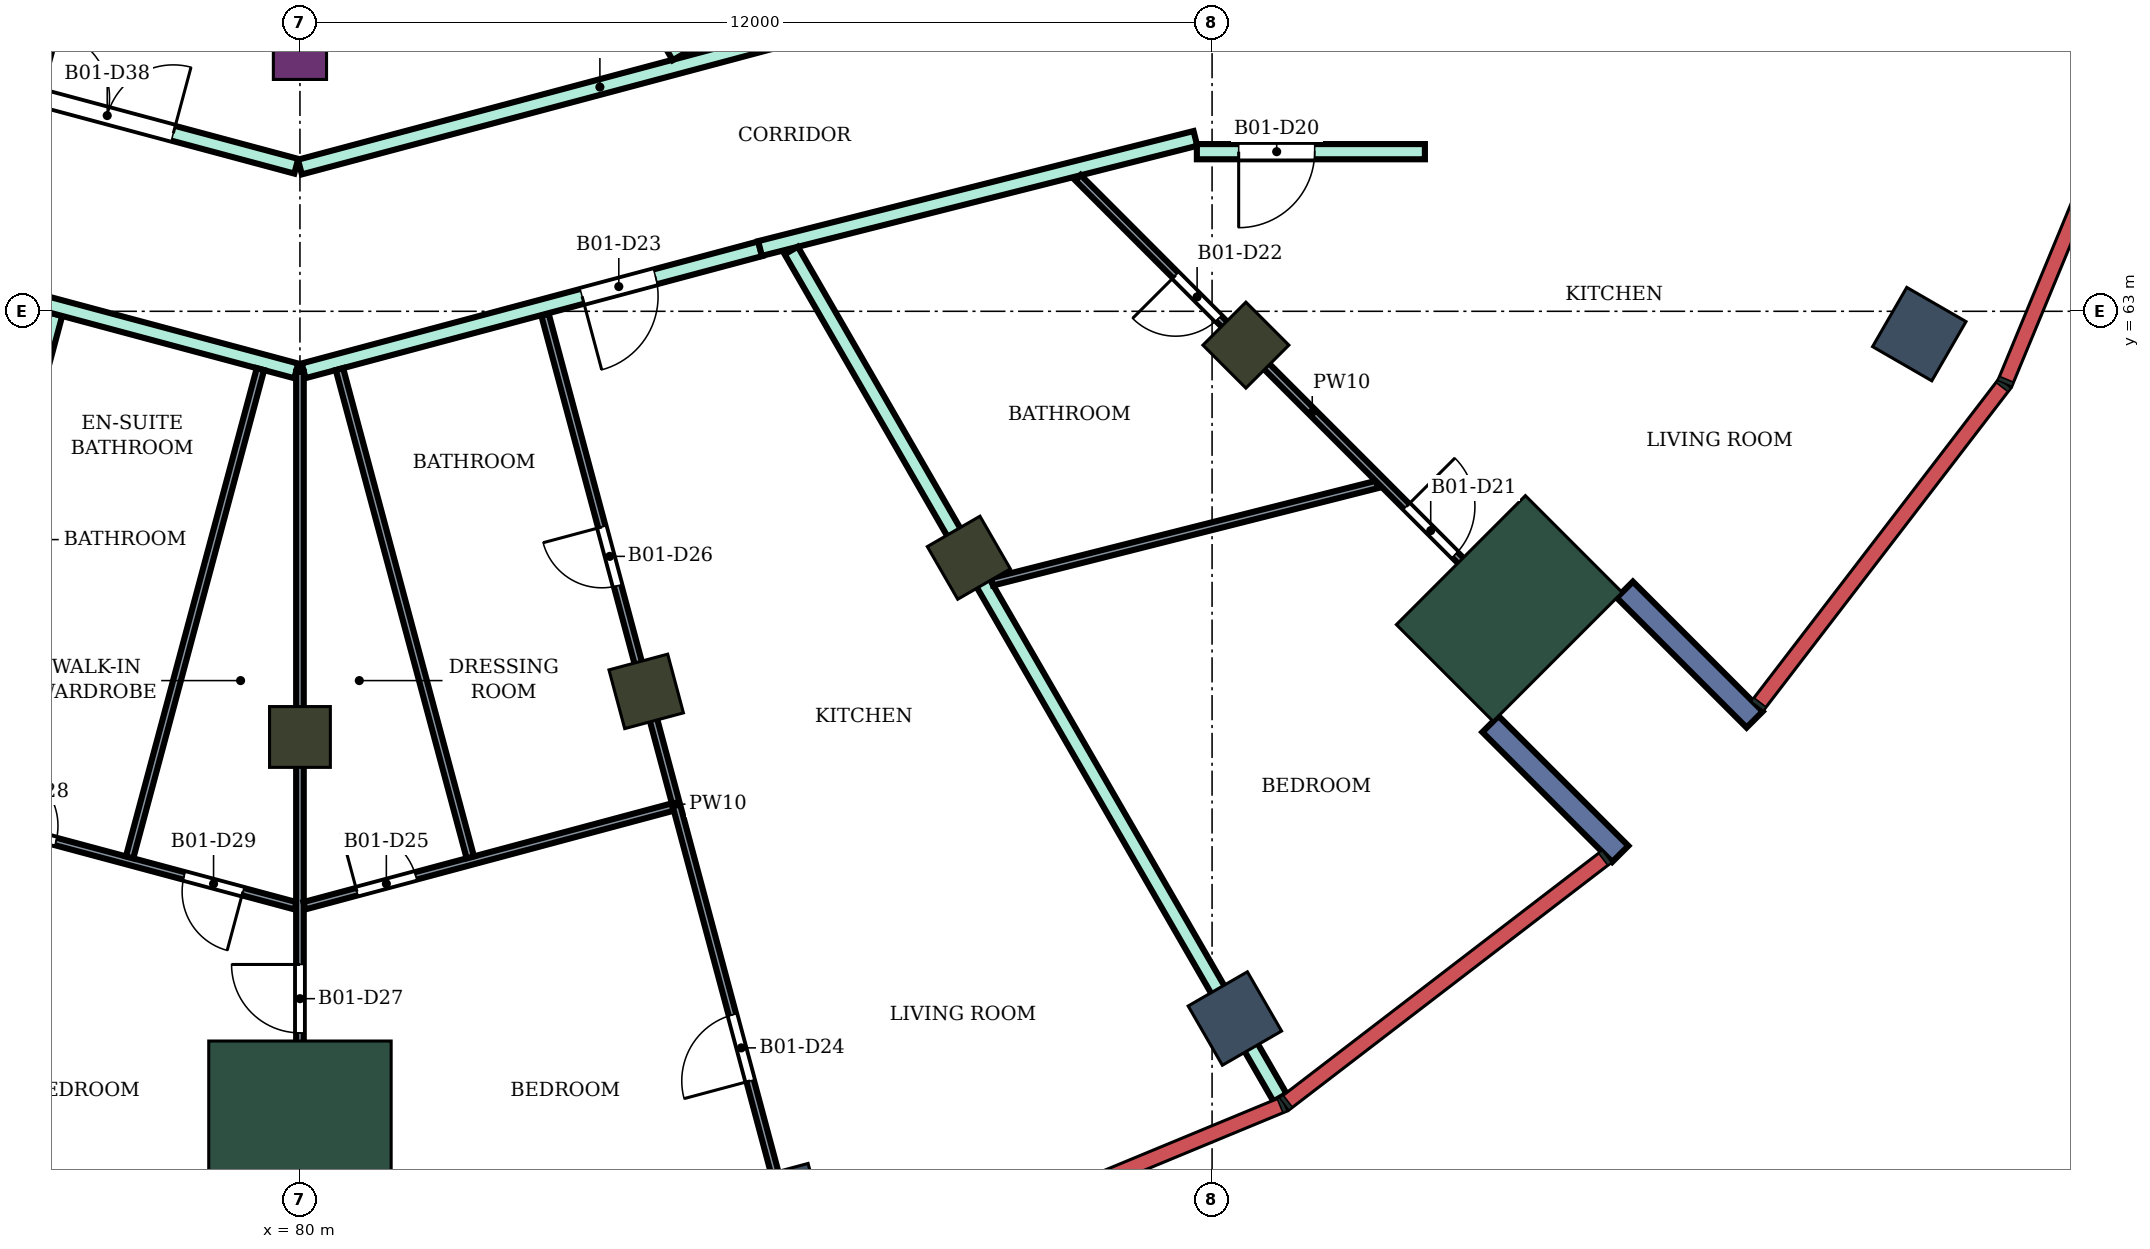
"""IFC4 building model, lengths in metres.
Left out: names, types, materials, properties, quantities, classifications, styles, units other than length and angle.
Written with IfcOpenShell. Run it as: python <this file> out.ifc"""

import sys

from ifc_helpers import new_model, si_unit, direction, frame, frame_2d, origin, origin_2d, place, context, subcontext, project, spatial, rectangle, extrude, element, fill, save


model = new_model("IFC4")
c1 = context("Model", 3, precision=1e-05, world=origin(), true_north=direction((0.0, 1.0)))
c2 = subcontext(c1, "Body", "Model", "MODEL_VIEW")
j1 = project(units=[si_unit("LENGTHUNIT", "METRE"), si_unit("PLANEANGLEUNIT", "RADIAN")], contexts=[c1])
p1 = place(None, origin())
s1 = spatial("IfcSite", under=j1, at=p1, CompositionType="ELEMENT")
p2 = place(p1, origin())
s2 = spatial("IfcBuilding", under=s1, at=p2, CompositionType="ELEMENT")
p3 = place(p2, frame((0.0, 0.0, 216.7)))
s3 = spatial("IfcBuildingStorey", under=s2, at=p3, CompositionType="ELEMENT", Elevation=216.7)
for number, where, z_axis, x_axis in (
    (1, (86.367, 51.238, 0.0), (0.0, 0.0, 1.0), (0.259, -0.966, 0.0)),
    (2, (92.3, 53.696, 0.0), (0.0, 0.0, 1.0), (0.5, -0.866, 0.0)),
    (3, (101.304, 62.7, 0.0), (0.0, 0.0, 1.0), (0.866, -0.5, 0.0)),
):
    element("IfcColumn", number, at=place(p3, frame(where, z_axis=z_axis, x_axis=x_axis)), inside=s3, PredefinedType="COLUMN", context=c2, shape_type="SweptSolid", body=[
        extrude(rectangle(XDim=0.9, YDim=0.9, at=origin_2d()), origin(), (0.0, 0.0, 1.0), 4.2),
    ])
for number, where, z_axis, x_axis in (
    (4, (80.0, 57.4, 0.0), (0.0, 0.0, 1.0), (0.0, -1.0, 0.0)),
    (5, (84.555, 58.0, 0.0), (0.0, 0.0, 1.0), (0.259, -0.966, 0.0)),
    (6, (88.8, 59.758, 0.0), (0.0, 0.0, 1.0), (0.5, -0.866, 0.0)),
    (7, (92.445, 62.555, 0.0), (0.0, 0.0, 1.0), (0.707, -0.707, 0.0)),
):
    element("IfcColumn", number, at=place(p3, frame(where, z_axis=z_axis, x_axis=x_axis)), inside=s3, PredefinedType="COLUMN", context=c2, shape_type="SweptSolid", body=[
        extrude(rectangle(XDim=0.8, YDim=0.8, at=origin_2d()), origin(), (0.0, 0.0, 1.0), 4.2),
    ])
p4 = place(p3, frame((80.0, 66.4, 0.0), z_axis=(0.0, 0.0, 1.0), x_axis=(0.0, -1.0, 0.0)))
e8 = element("IfcColumn", 8, at=p4, inside=s3, PredefinedType="COLUMN", context=c2, shape_type="SweptSolid", body=[
    extrude(rectangle(XDim=0.7, YDim=0.7, at=origin_2d()), origin(), (0.0, 0.0, 1.0), 4.2),
])
for number, where, z_axis, x_axis in (
    (9, (80.0, 52.5, 0.0), (0.0, 0.0, 1.0), (0.0, -1.0, 0.0)),
    (10, (95.91, 59.09, 0.0), (0.0, 0.0, 1.0), (0.707, -0.707, 0.0)),
):
    element("IfcColumn", number, at=place(p3, frame(where, z_axis=z_axis, x_axis=x_axis)), inside=s3, PredefinedType="COLUMN", context=c2, shape_type="SweptSolid", body=[
        extrude(rectangle(XDim=1.8, YDim=2.4, at=origin_2d()), origin(), (0.0, 0.0, 1.0), 4.2),
    ])
for number, where, z_axis, x_axis in (
    (11, (95.662, 57.57, 0.0), (0.0, 0.0, 1.0), (0.707, -0.707, 0.0)),
    (12, (97.43, 59.338, 0.0), (0.0, 0.0, 1.0), (0.707, -0.707, 0.0)),
):
    element("IfcWall", number, at=place(p3, frame(where, z_axis=z_axis, x_axis=x_axis)), inside=s3, PredefinedType="NOTDEFINED", context=c2, shape_type="SweptSolid", body=[
        extrude(rectangle(XDim=2.416, YDim=0.3, at=frame_2d((1.208, 0.0))), origin(), (0.0, 0.0, 1.0), 4.2),
    ])
p5 = place(p3, frame((73.323, 50.081, 0.0), z_axis=(0.0, 0.0, 1.0), x_axis=(0.258837030899, 0.96592100683, 0.0)))
e13 = element("IfcWall", 13, at=p5, inside=s3, PredefinedType="PARTITIONING", context=c2, shape_type="SweptSolid", body=[
    extrude(rectangle(XDim=13.338, YDim=0.2, at=frame_2d((6.669, 0.0))), origin(), (0.0, 0.0, 1.0), 3.75),
])
p6 = place(p3, frame((73.947, 63.826, 0.0), z_axis=(0.0, 0.0, 1.0), x_axis=(0.965876152316, -0.259004359784, 0.0)))
e14 = element("IfcWall", 14, at=p6, inside=s3, PredefinedType="PARTITIONING", context=c2, shape_type="SweptSolid", body=[
    extrude(rectangle(XDim=6.217, YDim=0.2, at=frame_2d((3.108, 0.0))), origin(), (0.0, 0.0, 1.0), 3.75),
])
p7 = place(p6, frame((0.137, 0.0, 0.0)))
e15 = element("IfcOpeningElement", 15, at=p7, cuts=e14, PredefinedType="OPENING", context=c2, shape_type="SweptSolid", body=[
    extrude(rectangle(XDim=1.0, YDim=2.1, at=frame_2d((0.5, 1.05))), frame((0.0, 0.11, 0.0), z_axis=(0.0, -1.0, 0.0), x_axis=(1.0, 0.0, 0.0)), (0.0, 0.0, 1.0), 0.22),
])
p8 = place(p3, frame((74.603, 66.342, 0.0), z_axis=(0.0, 0.0, 1.0), x_axis=(0.965895298152, -0.258932950796, 0.0)))
e16 = element("IfcWall", 16, at=p8, inside=s3, PredefinedType="PARTITIONING", context=c2, shape_type="SweptSolid", body=[
    extrude(rectangle(XDim=5.538, YDim=0.2, at=frame_2d((2.769, 0.0))), origin(), (0.0, 0.0, 1.0), 3.75),
])
p9 = place(p8, frame((2.062, 0.0, 0.0)))
e17 = element("IfcOpeningElement", 17, at=p9, cuts=e16, PredefinedType="OPENING", context=c2, shape_type="SweptSolid", body=[
    extrude(rectangle(XDim=1.8, YDim=2.1, at=frame_2d((0.9, 1.05))), frame((0.0, 0.11, 0.0), z_axis=(0.0, -1.0, 0.0), x_axis=(1.0, 0.0, 0.0)), (0.0, 0.0, 1.0), 0.22),
])
p10 = place(p3, frame((80.0, 64.898, 0.0), z_axis=(0.0, 0.0, 1.0), x_axis=(0.966237419782, 0.257653349704, 0.0)))
e18 = element("IfcWall", 18, at=p10, inside=s3, PredefinedType="PARTITIONING", context=c2, shape_type="SweptSolid", body=[
    extrude(rectangle(XDim=8.169, YDim=0.2, at=frame_2d((4.084, 0.0))), origin(), (0.0, 0.0, 1.0), 3.75),
])
p11 = place(p10, frame((6.428, 0.0, 0.0)))
e19 = element("IfcOpeningElement", 19, at=p11, cuts=e18, PredefinedType="OPENING", context=c2, shape_type="SweptSolid", body=[
    extrude(rectangle(XDim=0.9, YDim=2.1, at=frame_2d((0.45, 1.05))), frame((0.0, 0.11, 0.0), z_axis=(0.0, -1.0, 0.0), x_axis=(1.0, 0.0, 0.0)), (0.0, 0.0, 1.0), 0.22),
])
p12 = place(p3, frame((80.048, 62.217, 0.0), z_axis=(0.0, 0.0, 1.0), x_axis=(0.966097920642, 0.258175923996, 0.0)))
e20 = element("IfcWall", 20, at=p12, inside=s3, PredefinedType="PARTITIONING", context=c2, shape_type="SweptSolid", body=[
    extrude(rectangle(XDim=6.217, YDim=0.2, at=frame_2d((3.108, 0.0))), origin(), (0.0, 0.0, 1.0), 3.75),
])
p13 = place(p12, frame((3.792, 0.0, 0.0)))
e21 = element("IfcOpeningElement", 21, at=p13, cuts=e20, PredefinedType="OPENING", context=c2, shape_type="SweptSolid", body=[
    extrude(rectangle(XDim=1.0, YDim=2.1, at=frame_2d((0.5, 1.05))), frame((0.0, 0.11, 0.0), z_axis=(0.0, -1.0, 0.0), x_axis=(1.0, 0.0, 0.0)), (0.0, 0.0, 1.0), 0.22),
])
p14 = place(p3, frame((83.848, 68.331, 0.0), z_axis=(0.0, 0.0, 1.0), x_axis=(0.499851978358, -0.866110847255, 0.0)))
e22 = element("IfcWall", 22, at=p14, inside=s3, PredefinedType="PARTITIONING", context=c2, shape_type="SweptSolid", body=[
    extrude(rectangle(XDim=2.284, YDim=0.2, at=frame_2d((1.142, 0.0))), origin(), (0.0, 0.0, 1.0), 3.75),
])
p15 = place(p3, frame((86.053, 63.826, 0.0), z_axis=(0.0, 0.0, 1.0), x_axis=(0.969490004987, 0.245130843083, 0.0)))
e23 = element("IfcWall", 23, at=p15, inside=s3, PredefinedType="PARTITIONING", context=c2, shape_type="SweptSolid", body=[
    extrude(rectangle(XDim=5.908, YDim=0.2, at=frame_2d((2.954, 0.0))), origin(), (0.0, 0.0, 1.0), 3.75),
])
p16 = place(p3, frame((86.463, 63.8, 0.0), z_axis=(0.0, 0.0, 1.0), x_axis=(0.499827034849, -0.866125242234, 0.0)))
e24 = element("IfcWall", 24, at=p16, inside=s3, PredefinedType="PARTITIONING", context=c2, shape_type="SweptSolid", body=[
    extrude(rectangle(XDim=12.866, YDim=0.2, at=frame_2d((6.433, 0.0))), origin(), (0.0, 0.0, 1.0), 3.75),
])
p17 = place(p3, frame((91.8, 65.1, 0.0), z_axis=(0.0, 0.0, 1.0), x_axis=(1.0, 0.0, 0.0)))
e25 = element("IfcWall", 25, at=p17, inside=s3, PredefinedType="PARTITIONING", context=c2, shape_type="SweptSolid", body=[
    extrude(rectangle(XDim=3.0, YDim=0.2, at=frame_2d((1.5, 0.0))), origin(), (0.0, 0.0, 1.0), 3.75),
])
p18 = place(p17, frame((0.55, 0.0, 0.0)))
e26 = element("IfcOpeningElement", 26, at=p18, cuts=e25, PredefinedType="OPENING", context=c2, shape_type="SweptSolid", body=[
    extrude(rectangle(XDim=1.0, YDim=2.1, at=frame_2d((0.5, 1.05))), frame((0.0, 0.11, 0.0), z_axis=(0.0, -1.0, 0.0), x_axis=(1.0, 0.0, 0.0)), (0.0, 0.0, 1.0), 0.22),
])
p19 = place(p3, frame((70.188, 57.794, 0.0), z_axis=(0.0, 0.0, 1.0), x_axis=(0.965894620005, -0.25893548047, 0.0)))
e27 = element("IfcWall", 27, at=p19, inside=s3, PredefinedType="PARTITIONING", context=c2, shape_type="SweptSolid", body=[
    extrude(rectangle(XDim=10.098, YDim=0.1, at=frame_2d((5.049, 0.0))), origin(), (0.0, 0.0, 1.0), 3.75),
])
p20 = place(p19, frame((6.034, 0.0, 0.0)))
e28 = element("IfcOpeningElement", 28, at=p20, cuts=e27, PredefinedType="OPENING", context=c2, shape_type="SweptSolid", body=[
    extrude(rectangle(XDim=0.8, YDim=2.1, at=frame_2d((0.4, 1.05))), frame((0.0, 0.06, 0.0), z_axis=(0.0, -1.0, 0.0), x_axis=(1.0, 0.0, 0.0)), (0.0, 0.0, 1.0), 0.12),
])
p21 = place(p19, frame((8.581, 0.0, 0.0)))
e29 = element("IfcOpeningElement", 29, at=p21, cuts=e27, PredefinedType="OPENING", context=c2, shape_type="SweptSolid", body=[
    extrude(rectangle(XDim=0.8, YDim=2.1, at=frame_2d((0.4, 1.05))), frame((0.0, 0.06, 0.0), z_axis=(0.0, -1.0, 0.0), x_axis=(1.0, 0.0, 0.0)), (0.0, 0.0, 1.0), 0.12),
])
p22 = place(p19, frame((1.156, 0.0, 0.0)))
e30 = element("IfcOpeningElement", 30, at=p22, cuts=e27, PredefinedType="OPENING", context=c2, shape_type="SweptSolid", body=[
    extrude(rectangle(XDim=0.9, YDim=2.1, at=frame_2d((0.45, 1.05))), frame((0.0, 0.06, 0.0), z_axis=(0.0, -1.0, 0.0), x_axis=(1.0, 0.0, 0.0)), (0.0, 0.0, 1.0), 0.12),
])
p23 = place(p3, frame((77.759, 55.816, 0.0), z_axis=(0.0, 0.0, 1.0), x_axis=(0.258802763352, 0.965930188824, 0.0)))
e31 = element("IfcWall", 31, at=p23, inside=s3, PredefinedType="PARTITIONING", context=c2, shape_type="SweptSolid", body=[
    extrude(rectangle(XDim=6.65, YDim=0.1, at=frame_2d((3.325, 0.0))), origin(), (0.0, 0.0, 1.0), 3.75),
])
p24 = place(p3, frame((80.0, 51.8, 0.0), z_axis=(0.0, 0.0, 1.0), x_axis=(0.0, 1.0, 0.0)))
e32 = element("IfcWall", 32, at=p24, inside=s3, PredefinedType="PARTITIONING", context=c2, shape_type="SweptSolid", body=[
    extrude(rectangle(XDim=10.404, YDim=0.1, at=frame_2d((5.202, 0.0))), origin(), (0.0, 0.0, 1.0), 3.75),
])
p25 = place(p24, frame((1.707, 0.0, 0.0)))
e33 = element("IfcOpeningElement", 33, at=p25, cuts=e32, PredefinedType="OPENING", context=c2, shape_type="SweptSolid", body=[
    extrude(rectangle(XDim=0.9, YDim=2.1, at=frame_2d((0.45, 1.05))), frame((0.0, 0.06, 0.0), z_axis=(0.0, -1.0, 0.0), x_axis=(1.0, 0.0, 0.0)), (0.0, 0.0, 1.0), 0.12),
])
p26 = place(p3, frame((80.058, 55.179, 0.0), z_axis=(0.0, 0.0, 1.0), x_axis=(0.965917403523, 0.258850477246, 0.0)))
e34 = element("IfcWall", 34, at=p26, inside=s3, PredefinedType="PARTITIONING", context=c2, shape_type="SweptSolid", body=[
    extrude(rectangle(XDim=5.014, YDim=0.1, at=frame_2d((2.507, 0.0))), origin(), (0.0, 0.0, 1.0), 3.75),
])
p27 = place(p26, frame((0.717, 0.0, 0.0)))
e35 = element("IfcOpeningElement", 35, at=p27, cuts=e34, PredefinedType="OPENING", context=c2, shape_type="SweptSolid", body=[
    extrude(rectangle(XDim=0.8, YDim=2.1, at=frame_2d((0.4, 1.05))), frame((0.0, 0.06, 0.0), z_axis=(0.0, -1.0, 0.0), x_axis=(1.0, 0.0, 0.0)), (0.0, 0.0, 1.0), 0.12),
])
p28 = place(p3, frame((80.52, 62.24, 0.0), z_axis=(0.0, 0.0, 1.0), x_axis=(0.258802763352, -0.965930188824, 0.0)))
e36 = element("IfcWall", 36, at=p28, inside=s3, PredefinedType="PARTITIONING", context=c2, shape_type="SweptSolid", body=[
    extrude(rectangle(XDim=6.65, YDim=0.1, at=frame_2d((3.325, 0.0))), origin(), (0.0, 0.0, 1.0), 3.75),
])
p29 = place(p3, frame((83.224, 62.954, 0.0), z_axis=(0.0, 0.0, 1.0), x_axis=(0.258647574365, -0.965971755423, 0.0)))
e37 = element("IfcWall", 37, at=p29, inside=s3, PredefinedType="PARTITIONING", context=c2, shape_type="SweptSolid", body=[
    extrude(rectangle(XDim=13.328, YDim=0.1, at=frame_2d((6.664, 0.0))), origin(), (0.0, 0.0, 1.0), 3.75),
])
p30 = place(p29, frame((9.534, 0.0, 0.0)))
e38 = element("IfcOpeningElement", 38, at=p30, cuts=e37, PredefinedType="OPENING", context=c2, shape_type="SweptSolid", body=[
    extrude(rectangle(XDim=0.9, YDim=2.1, at=frame_2d((0.45, 1.05))), frame((0.0, 0.06, 0.0), z_axis=(0.0, -1.0, 0.0), x_axis=(1.0, 0.0, 0.0)), (0.0, 0.0, 1.0), 0.12),
])
p31 = place(p29, frame((2.89, 0.0, 0.0)))
e39 = element("IfcOpeningElement", 39, at=p31, cuts=e37, PredefinedType="OPENING", context=c2, shape_type="SweptSolid", body=[
    extrude(rectangle(XDim=0.8, YDim=2.1, at=frame_2d((0.4, 1.05))), frame((0.0, 0.06, 0.0), z_axis=(0.0, -1.0, 0.0), x_axis=(1.0, 0.0, 0.0)), (0.0, 0.0, 1.0), 0.12),
])
p32 = place(p3, frame((89.106, 59.441, 0.0), z_axis=(0.0, 0.0, 1.0), x_axis=(0.969462385749, 0.245240051009, 0.0)))
e40 = element("IfcWall", 40, at=p32, inside=s3, PredefinedType="PARTITIONING", context=c2, shape_type="SweptSolid", body=[
    extrude(rectangle(XDim=5.223, YDim=0.1, at=frame_2d((2.612, 0.0))), origin(), (0.0, 0.0, 1.0), 3.75),
])
p33 = place(p3, frame((90.236, 64.758, 0.0), z_axis=(0.0, 0.0, 1.0), x_axis=(0.706938769128, -0.707274753334, 0.0)))
e41 = element("IfcWall", 41, at=p33, inside=s3, PredefinedType="PARTITIONING", context=c2, shape_type="SweptSolid", body=[
    extrude(rectangle(XDim=8.72, YDim=0.1, at=frame_2d((4.36, 0.0))), origin(), (0.0, 0.0, 1.0), 3.75),
])
p34 = place(p33, frame((6.115, 0.0, 0.0)))
e42 = element("IfcOpeningElement", 42, at=p34, cuts=e41, PredefinedType="OPENING", context=c2, shape_type="SweptSolid", body=[
    extrude(rectangle(XDim=0.9, YDim=2.1, at=frame_2d((0.45, 1.05))), frame((0.0, 0.06, 0.0), z_axis=(0.0, -1.0, 0.0), x_axis=(1.0, 0.0, 0.0)), (0.0, 0.0, 1.0), 0.12),
])
p35 = place(p33, frame((1.817, 0.0, 0.0)))
e43 = element("IfcOpeningElement", 43, at=p35, cuts=e41, PredefinedType="OPENING", context=c2, shape_type="SweptSolid", body=[
    extrude(rectangle(XDim=0.8, YDim=2.1, at=frame_2d((0.4, 1.05))), frame((0.0, 0.06, 0.0), z_axis=(0.0, -1.0, 0.0), x_axis=(1.0, 0.0, 0.0)), (0.0, 0.0, 1.0), 0.12),
])
p36 = place(p18, frame((1.0, 0.0, 0.0), z_axis=(0.0, 0.0, 1.0), x_axis=(-1.0, 0.0, 0.0)))
e44 = element("IfcDoor", 44, at=p36, inside=s3, OperationType="SINGLE_SWING_RIGHT", PredefinedType="DOOR", context=c2, shape_type="SweptSolid", body=[
    extrude(rectangle(XDim=1.0, YDim=2.1, at=frame_2d((0.5, 1.05))), frame((0.0, 0.025, 0.0), z_axis=(0.0, -1.0, 0.0), x_axis=(1.0, 0.0, 0.0)), (0.0, 0.0, 1.0), 0.05),
])
fill(e26, e44)
p37 = place(p34, origin())
e45 = element("IfcDoor", 45, at=p37, inside=s3, OperationType="SINGLE_SWING_LEFT", PredefinedType="DOOR", context=c2, shape_type="SweptSolid", body=[
    extrude(rectangle(XDim=0.9, YDim=2.1, at=frame_2d((0.45, 1.05))), frame((0.0, 0.025, 0.0), z_axis=(0.0, -1.0, 0.0), x_axis=(1.0, 0.0, 0.0)), (0.0, 0.0, 1.0), 0.05),
])
fill(e42, e45)
p38 = place(p35, frame((0.8, 0.0, 0.0), z_axis=(0.0, 0.0, 1.0), x_axis=(-1.0, 0.0, 0.0)))
e46 = element("IfcDoor", 46, at=p38, inside=s3, OperationType="SINGLE_SWING_RIGHT", PredefinedType="DOOR", context=c2, shape_type="SweptSolid", body=[
    extrude(rectangle(XDim=0.8, YDim=2.1, at=frame_2d((0.4, 1.05))), frame((0.0, 0.025, 0.0), z_axis=(0.0, -1.0, 0.0), x_axis=(1.0, 0.0, 0.0)), (0.0, 0.0, 1.0), 0.05),
])
fill(e43, e46)
p39 = place(p13, frame((1.0, 0.0, 0.0), z_axis=(0.0, 0.0, 1.0), x_axis=(-1.0, 0.0, 0.0)))
e47 = element("IfcDoor", 47, at=p39, inside=s3, OperationType="SINGLE_SWING_RIGHT", PredefinedType="DOOR", context=c2, shape_type="SweptSolid", body=[
    extrude(rectangle(XDim=1.0, YDim=2.1, at=frame_2d((0.5, 1.05))), frame((0.0, 0.025, 0.0), z_axis=(0.0, -1.0, 0.0), x_axis=(1.0, 0.0, 0.0)), (0.0, 0.0, 1.0), 0.05),
])
fill(e21, e47)
p40 = place(p30, frame((0.9, 0.0, 0.0), z_axis=(0.0, 0.0, 1.0), x_axis=(-1.0, 0.0, 0.0)))
e48 = element("IfcDoor", 48, at=p40, inside=s3, OperationType="SINGLE_SWING_LEFT", PredefinedType="DOOR", context=c2, shape_type="SweptSolid", body=[
    extrude(rectangle(XDim=0.9, YDim=2.1, at=frame_2d((0.45, 1.05))), frame((0.0, 0.025, 0.0), z_axis=(0.0, -1.0, 0.0), x_axis=(1.0, 0.0, 0.0)), (0.0, 0.0, 1.0), 0.05),
])
fill(e38, e48)
p41 = place(p27, origin())
e49 = element("IfcDoor", 49, at=p41, inside=s3, OperationType="SINGLE_SWING_LEFT", PredefinedType="DOOR", context=c2, shape_type="SweptSolid", body=[
    extrude(rectangle(XDim=0.8, YDim=2.1, at=frame_2d((0.4, 1.05))), frame((0.0, 0.025, 0.0), z_axis=(0.0, -1.0, 0.0), x_axis=(1.0, 0.0, 0.0)), (0.0, 0.0, 1.0), 0.05),
])
fill(e35, e49)
p42 = place(p31, frame((0.8, 0.0, 0.0), z_axis=(0.0, 0.0, 1.0), x_axis=(-1.0, 0.0, 0.0)))
e50 = element("IfcDoor", 50, at=p42, inside=s3, OperationType="SINGLE_SWING_RIGHT", PredefinedType="DOOR", context=c2, shape_type="SweptSolid", body=[
    extrude(rectangle(XDim=0.8, YDim=2.1, at=frame_2d((0.4, 1.05))), frame((0.0, 0.025, 0.0), z_axis=(0.0, -1.0, 0.0), x_axis=(1.0, 0.0, 0.0)), (0.0, 0.0, 1.0), 0.05),
])
fill(e39, e50)
p43 = place(p25, origin())
e51 = element("IfcDoor", 51, at=p43, inside=s3, OperationType="SINGLE_SWING_RIGHT", PredefinedType="DOOR", context=c2, shape_type="SweptSolid", body=[
    extrude(rectangle(XDim=0.9, YDim=2.1, at=frame_2d((0.45, 1.05))), frame((0.0, 0.025, 0.0), z_axis=(0.0, -1.0, 0.0), x_axis=(1.0, 0.0, 0.0)), (0.0, 0.0, 1.0), 0.05),
])
fill(e33, e51)
p44 = place(p20, origin())
e52 = element("IfcDoor", 52, at=p44, inside=s3, OperationType="SINGLE_SWING_LEFT", PredefinedType="DOOR", context=c2, shape_type="SweptSolid", body=[
    extrude(rectangle(XDim=0.8, YDim=2.1, at=frame_2d((0.4, 1.05))), frame((0.0, 0.025, 0.0), z_axis=(0.0, -1.0, 0.0), x_axis=(1.0, 0.0, 0.0)), (0.0, 0.0, 1.0), 0.05),
])
fill(e28, e52)
p45 = place(p21, frame((0.8, 0.0, 0.0), z_axis=(0.0, 0.0, 1.0), x_axis=(-1.0, 0.0, 0.0)))
e53 = element("IfcDoor", 53, at=p45, inside=s3, OperationType="SINGLE_SWING_LEFT", PredefinedType="DOOR", context=c2, shape_type="SweptSolid", body=[
    extrude(rectangle(XDim=0.8, YDim=2.1, at=frame_2d((0.4, 1.05))), frame((0.0, 0.025, 0.0), z_axis=(0.0, -1.0, 0.0), x_axis=(1.0, 0.0, 0.0)), (0.0, 0.0, 1.0), 0.05),
])
fill(e29, e53)
p46 = place(p9, origin())
e54 = element("IfcDoor", 54, at=p46, inside=s3, OperationType="DOUBLE_DOOR_SINGLE_SWING", PredefinedType="DOOR", context=c2, shape_type="SweptSolid", body=[
    extrude(rectangle(XDim=1.8, YDim=2.1, at=frame_2d((0.9, 1.05))), frame((0.0, 0.025, 0.0), z_axis=(0.0, -1.0, 0.0), x_axis=(1.0, 0.0, 0.0)), (0.0, 0.0, 1.0), 0.05),
])
fill(e17, e54)
save(model, sys.argv[1])
